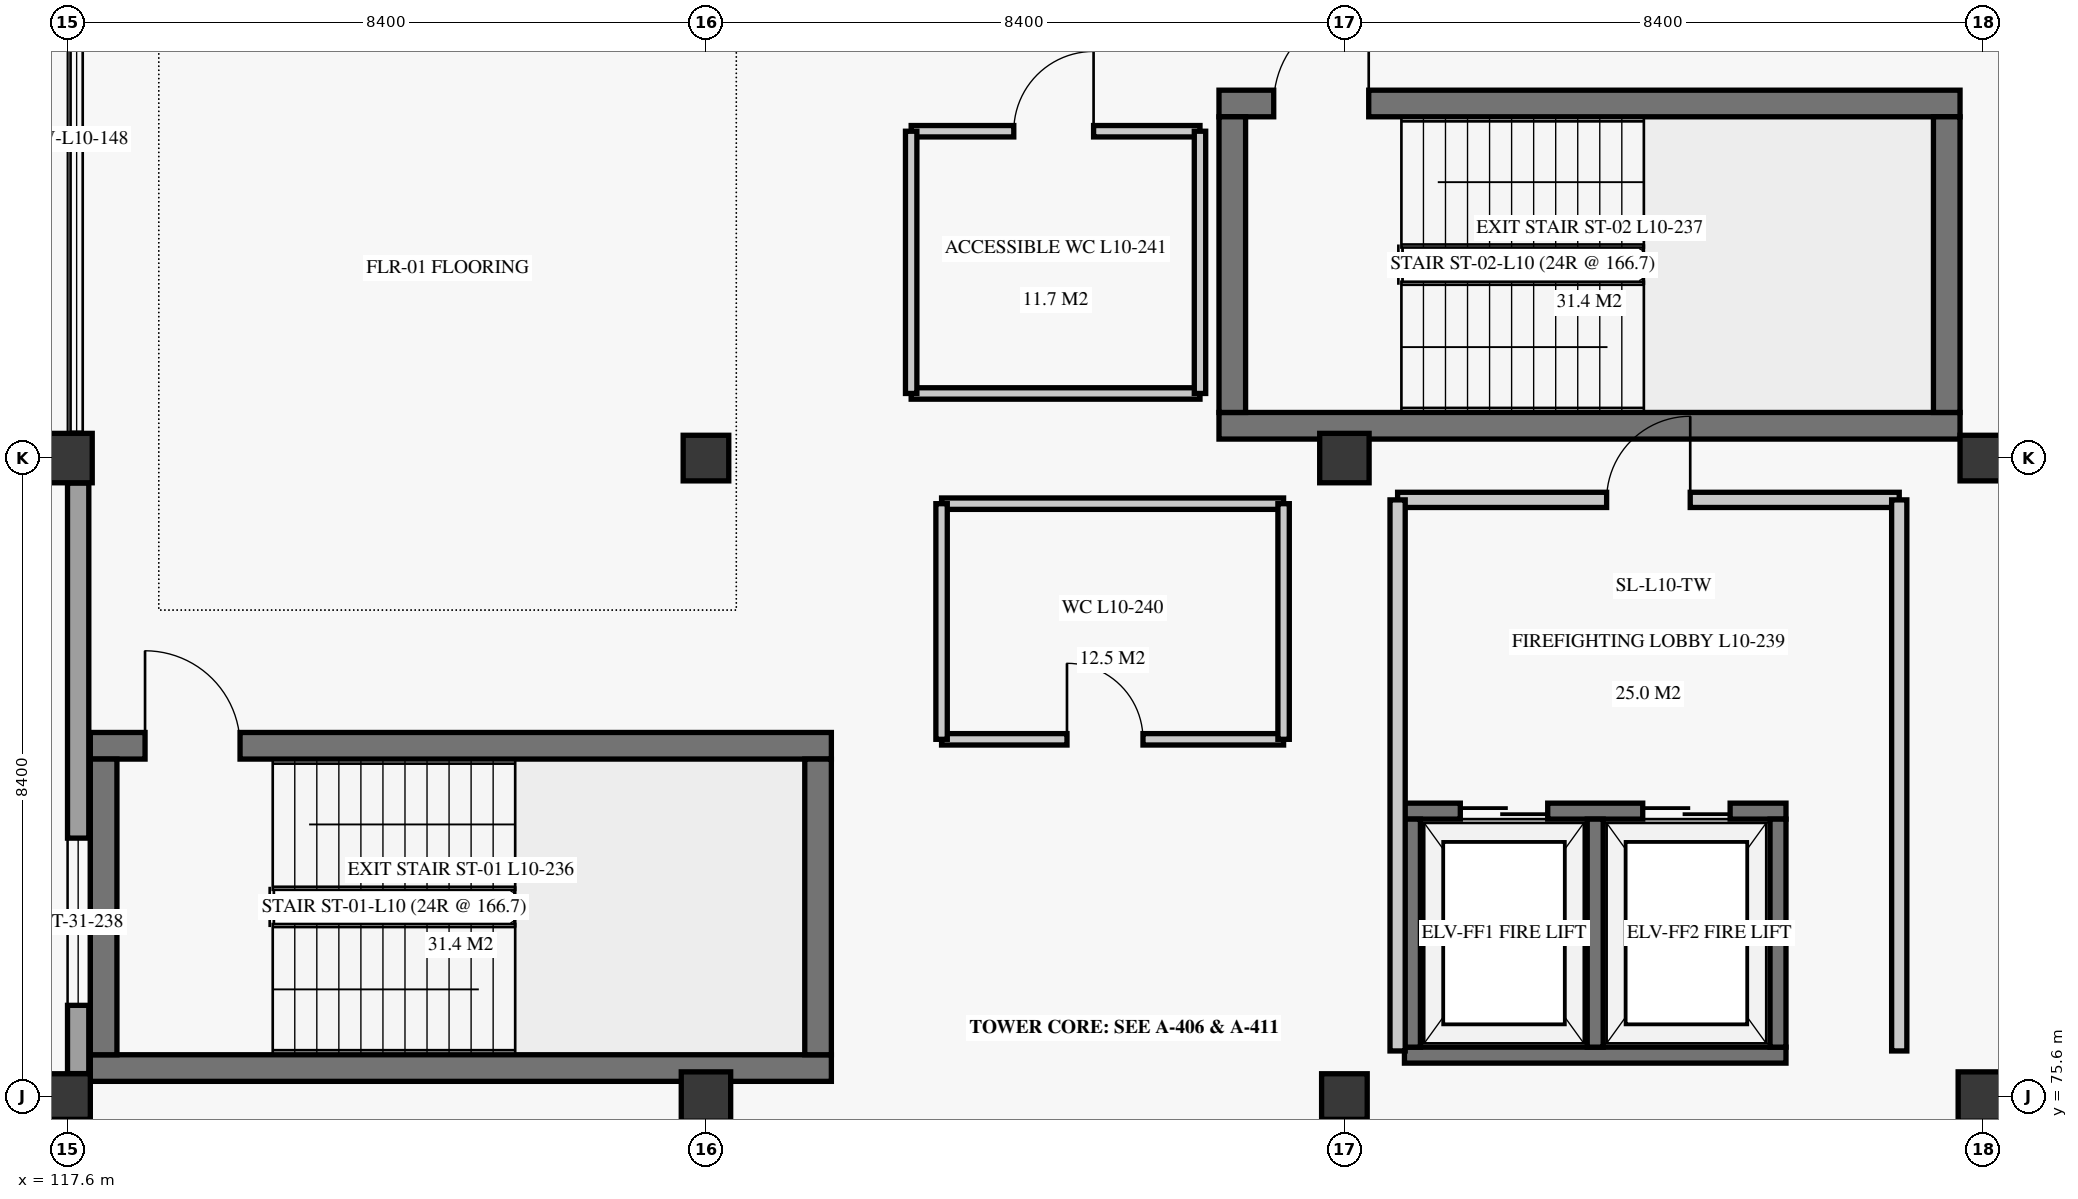
"""IFC4 building model, lengths in metres.
Left out: names, types, materials, properties, quantities, classifications, styles, units other than length and angle.
Written with IfcOpenShell. Run it as: python <this file> out.ifc"""

import sys

from ifc_helpers import new_model, si_unit, direction, frame, frame_2d, origin, origin_2d, place, context, subcontext, project, spatial, rectangle, extrude, element, fill, save


model = new_model("IFC4")
c1 = context("Model", 3, precision=1e-05, world=origin(), true_north=direction((0.0, 1.0)))
c2 = subcontext(c1, "Body", "Model", "MODEL_VIEW")
j1 = project(units=[si_unit("LENGTHUNIT", "METRE"), si_unit("PLANEANGLEUNIT", "RADIAN")], contexts=[c1])
p1 = place(None, origin())
s1 = spatial("IfcSite", under=j1, at=p1, CompositionType="ELEMENT")
p2 = place(p1, origin())
s2 = spatial("IfcBuilding", under=s1, at=p2, CompositionType="ELEMENT")
p3 = place(p2, frame((0.0, 0.0, 42.7)))
s3 = spatial("IfcBuildingStorey", under=s2, at=p3, CompositionType="ELEMENT", Elevation=42.7)
p4 = place(p3, frame((117.6, 75.6, 0.0), z_axis=(0.0, 0.0, 1.0), x_axis=(1.0, 0.0, 0.0)))
e1 = element("IfcColumn", 1, at=p4, inside=s3, PredefinedType="COLUMN", context=c2, shape_type="SweptSolid", body=[
    extrude(rectangle(XDim=0.6, YDim=0.6, at=origin_2d()), origin(), (0.0, 0.0, 1.0), 3.72),
])
for number, where, z_axis, x_axis in (
    (2, (117.6, 84.0, 0.0), (0.0, 0.0, 1.0), (1.0, 0.0, 0.0)),
    (3, (126.0, 75.6, 0.0), (0.0, 0.0, 1.0), (1.0, 0.0, 0.0)),
):
    element("IfcColumn", number, at=place(p3, frame(where, z_axis=z_axis, x_axis=x_axis)), inside=s3, PredefinedType="COLUMN", context=c2, shape_type="SweptSolid", body=[
        extrude(rectangle(XDim=0.65, YDim=0.65, at=origin_2d()), origin(), (0.0, 0.0, 1.0), 3.72),
    ])
for number, where, z_axis, x_axis in (
    (4, (126.0, 84.0, 0.0), (0.0, 0.0, 1.0), (1.0, 0.0, 0.0)),
    (5, (134.4, 75.6, 0.0), (0.0, 0.0, 1.0), (1.0, 0.0, 0.0)),
):
    element("IfcColumn", number, at=place(p3, frame(where, z_axis=z_axis, x_axis=x_axis)), inside=s3, PredefinedType="COLUMN", context=c2, shape_type="SweptSolid", body=[
        extrude(rectangle(XDim=0.6, YDim=0.6, at=origin_2d()), origin(), (0.0, 0.0, 1.0), 3.72),
    ])
for number, where, z_axis, x_axis in (
    (6, (134.4, 84.0, 0.0), (0.0, 0.0, 1.0), (1.0, 0.0, 0.0)),
    (7, (142.8, 75.6, 0.0), (0.0, 0.0, 1.0), (1.0, 0.0, 0.0)),
):
    element("IfcColumn", number, at=place(p3, frame(where, z_axis=z_axis, x_axis=x_axis)), inside=s3, PredefinedType="COLUMN", context=c2, shape_type="SweptSolid", body=[
        extrude(rectangle(XDim=0.65, YDim=0.65, at=origin_2d()), origin(), (0.0, 0.0, 1.0), 3.72),
    ])
p5 = place(p3, frame((142.8, 84.0, 0.0), z_axis=(0.0, 0.0, 1.0), x_axis=(1.0, 0.0, 0.0)))
e8 = element("IfcColumn", 8, at=p5, inside=s3, PredefinedType="COLUMN", context=c2, shape_type="SweptSolid", body=[
    extrude(rectangle(XDim=0.6, YDim=0.6, at=origin_2d()), origin(), (0.0, 0.0, 1.0), 3.72),
])
p6 = place(p3, frame((117.74, 75.902, 0.0), z_axis=(0.0, 0.0, 1.0), x_axis=(0.0, 1.0, 0.0)))
e9 = element("IfcWall", 9, at=p6, inside=s3, PredefinedType="SOLIDWALL", context=c2, shape_type="SweptSolid", body=[
    extrude(rectangle(XDim=7.77, YDim=0.28, at=frame_2d((3.885, 0.0))), origin(), (0.0, 0.0, 1.0), 3.04),
])
p7 = place(p6, frame((0.898, 0.0, 0.85)))
e10 = element("IfcOpeningElement", 10, at=p7, cuts=e9, PredefinedType="OPENING", context=c2, shape_type="SweptSolid", body=[
    extrude(rectangle(XDim=2.2, YDim=1.8, at=frame_2d((1.1, 0.9))), frame((0.0, 0.15, 0.0), z_axis=(0.0, -1.0, 0.0), x_axis=(1.0, 0.0, 0.0)), (0.0, 0.0, 1.0), 0.3),
])
p8 = place(p3, frame((117.9, 75.975, 0.0), z_axis=(0.0, 0.0, 1.0), x_axis=(1.0, 0.0, 0.0)))
e11 = element("IfcWall", 11, at=p8, inside=s3, PredefinedType="SHEAR", context=c2, shape_type="SweptSolid", body=[
    extrude(rectangle(XDim=9.75, YDim=0.35, at=frame_2d((4.875, 0.0))), origin(), (0.0, 0.0, 1.0), 3.72),
])
p9 = place(p3, frame((117.9, 80.215, 0.0), z_axis=(0.0, 0.0, 1.0), x_axis=(1.0, 0.0, 0.0)))
e12 = element("IfcWall", 12, at=p9, inside=s3, PredefinedType="SHEAR", context=c2, shape_type="SweptSolid", body=[
    extrude(rectangle(XDim=9.75, YDim=0.35, at=frame_2d((4.875, 0.0))), origin(), (0.0, 0.0, 1.0), 3.72),
])
p10 = place(p9, frame((0.72, 0.0, 0.0)))
e13 = element("IfcOpeningElement", 13, at=p10, cuts=e12, PredefinedType="OPENING", context=c2, shape_type="SweptSolid", body=[
    extrude(rectangle(XDim=1.25, YDim=2.2, at=frame_2d((0.625, 1.1))), frame((0.0, 0.185, 0.0), z_axis=(0.0, -1.0, 0.0), x_axis=(1.0, 0.0, 0.0)), (0.0, 0.0, 1.0), 0.37),
])
for number, where, z_axis, x_axis in (
    (14, (118.075, 76.15, 0.0), (0.0, 0.0, 1.0), (0.0, 1.0, 0.0)),
    (15, (127.475, 76.15, 0.0), (0.0, 0.0, 1.0), (0.0, 1.0, 0.0)),
):
    element("IfcWall", number, at=place(p3, frame(where, z_axis=z_axis, x_axis=x_axis)), inside=s3, PredefinedType="SHEAR", context=c2, shape_type="SweptSolid", body=[
        extrude(rectangle(XDim=3.89, YDim=0.35, at=frame_2d((1.945, 0.0))), origin(), (0.0, 0.0, 1.0), 3.72),
    ])
p11 = place(p3, frame((132.75, 84.425, 0.0), z_axis=(0.0, 0.0, 1.0), x_axis=(1.0, 0.0, 0.0)))
e16 = element("IfcWall", 16, at=p11, inside=s3, PredefinedType="SHEAR", context=c2, shape_type="SweptSolid", body=[
    extrude(rectangle(XDim=9.75, YDim=0.35, at=frame_2d((4.875, 0.0))), origin(), (0.0, 0.0, 1.0), 3.72),
])
p12 = place(p3, frame((132.75, 88.665, 0.0), z_axis=(0.0, 0.0, 1.0), x_axis=(1.0, 0.0, 0.0)))
e17 = element("IfcWall", 17, at=p12, inside=s3, PredefinedType="SHEAR", context=c2, shape_type="SweptSolid", body=[
    extrude(rectangle(XDim=9.75, YDim=0.35, at=frame_2d((4.875, 0.0))), origin(), (0.0, 0.0, 1.0), 3.72),
])
p13 = place(p12, frame((0.72, 0.0, 0.0)))
e18 = element("IfcOpeningElement", 18, at=p13, cuts=e17, PredefinedType="OPENING", context=c2, shape_type="SweptSolid", body=[
    extrude(rectangle(XDim=1.25, YDim=2.2, at=frame_2d((0.625, 1.1))), frame((0.0, 0.185, 0.0), z_axis=(0.0, -1.0, 0.0), x_axis=(1.0, 0.0, 0.0)), (0.0, 0.0, 1.0), 0.37),
])
for number, where, z_axis, x_axis in (
    (19, (132.925, 84.6, 0.0), (0.0, 0.0, 1.0), (0.0, 1.0, 0.0)),
    (20, (142.325, 84.6, 0.0), (0.0, 0.0, 1.0), (0.0, 1.0, 0.0)),
):
    element("IfcWall", number, at=place(p3, frame(where, z_axis=z_axis, x_axis=x_axis)), inside=s3, PredefinedType="SHEAR", context=c2, shape_type="SweptSolid", body=[
        extrude(rectangle(XDim=3.89, YDim=0.35, at=frame_2d((1.945, 0.0))), origin(), (0.0, 0.0, 1.0), 3.72),
    ])
p14 = place(p3, frame((135.19, 76.145, 0.0), z_axis=(0.0, 0.0, 1.0), x_axis=(1.0, 0.0, 0.0)))
e21 = element("IfcWall", 21, at=p14, inside=s3, PredefinedType="SHEAR", context=c2, shape_type="SweptSolid", body=[
    extrude(rectangle(XDim=5.02, YDim=0.21, at=frame_2d((2.51, 0.0))), origin(), (0.0, 0.0, 1.0), 3.72),
])
p15 = place(p3, frame((135.19, 79.355, 0.0), z_axis=(0.0, 0.0, 1.0), x_axis=(1.0, 0.0, 0.0)))
e22 = element("IfcWall", 22, at=p15, inside=s3, PredefinedType="SHEAR", context=c2, shape_type="SweptSolid", body=[
    extrude(rectangle(XDim=5.02, YDim=0.21, at=frame_2d((2.51, 0.0))), origin(), (0.0, 0.0, 1.0), 3.72),
])
p16 = place(p15, frame((0.735, 0.0, 0.0)))
e23 = element("IfcOpeningElement", 23, at=p16, cuts=e22, PredefinedType="OPENING", context=c2, shape_type="SweptSolid", body=[
    extrude(rectangle(XDim=1.15, YDim=2.2, at=frame_2d((0.575, 1.1))), frame((0.0, 0.115, 0.0), z_axis=(0.0, -1.0, 0.0), x_axis=(1.0, 0.0, 0.0)), (0.0, 0.0, 1.0), 0.23),
])
p17 = place(p15, frame((3.135, 0.0, 0.0)))
e24 = element("IfcOpeningElement", 24, at=p17, cuts=e22, PredefinedType="OPENING", context=c2, shape_type="SweptSolid", body=[
    extrude(rectangle(XDim=1.15, YDim=2.2, at=frame_2d((0.575, 1.1))), frame((0.0, 0.115, 0.0), z_axis=(0.0, -1.0, 0.0), x_axis=(1.0, 0.0, 0.0)), (0.0, 0.0, 1.0), 0.23),
])
for number, where, z_axis, x_axis in (
    (25, (135.295, 76.25, 0.0), (0.0, 0.0, 1.0), (0.0, 1.0, 0.0)),
    (26, (140.105, 76.25, 0.0), (0.0, 0.0, 1.0), (0.0, 1.0, 0.0)),
    (27, (137.7, 76.25, 0.0), (0.0, 0.0, 1.0), (0.0, 1.0, 0.0)),
):
    element("IfcWall", number, at=place(p3, frame(where, z_axis=z_axis, x_axis=x_axis)), inside=s3, PredefinedType="SHEAR", context=c2, shape_type="SweptSolid", body=[
        extrude(rectangle(XDim=3.0, YDim=0.21, at=frame_2d((1.5, 0.0))), origin(), (0.0, 0.0, 1.0), 3.72),
    ])
p18 = place(p3, frame((135.1, 83.45, 0.0), z_axis=(0.0, 0.0, 1.0), x_axis=(1.0, 0.0, 0.0)))
e28 = element("IfcWall", 28, at=p18, inside=s3, PredefinedType="PARTITIONING", context=c2, shape_type="SweptSolid", body=[
    extrude(rectangle(XDim=6.6, YDim=0.2, at=frame_2d((3.3, 0.0))), origin(), (0.0, 0.0, 1.0), 3.34),
])
p19 = place(p18, frame((2.75, 0.0, 0.0)))
e29 = element("IfcOpeningElement", 29, at=p19, cuts=e28, PredefinedType="OPENING", context=c2, shape_type="SweptSolid", body=[
    extrude(rectangle(XDim=1.1, YDim=2.2, at=frame_2d((0.55, 1.1))), frame((0.0, 0.11, 0.0), z_axis=(0.0, -1.0, 0.0), x_axis=(1.0, 0.0, 0.0)), (0.0, 0.0, 1.0), 0.22),
])
for number, where, z_axis, x_axis in (
    (30, (135.1, 76.2, 0.0), (0.0, 0.0, 1.0), (0.0, 1.0, 0.0)),
    (31, (141.7, 76.2, 0.0), (0.0, 0.0, 1.0), (0.0, 1.0, 0.0)),
):
    element("IfcWall", number, at=place(p3, frame(where, z_axis=z_axis, x_axis=x_axis)), inside=s3, PredefinedType="PARTITIONING", context=c2, shape_type="SweptSolid", body=[
        extrude(rectangle(XDim=7.25, YDim=0.2, at=frame_2d((3.625, 0.0))), origin(), (0.0, 0.0, 1.0), 3.34),
    ])
p20 = place(p3, frame((129.1, 80.3, 0.0), z_axis=(0.0, 0.0, 1.0), x_axis=(1.0, 0.0, 0.0)))
e32 = element("IfcWall", 32, at=p20, inside=s3, PredefinedType="PARTITIONING", context=c2, shape_type="SweptSolid", body=[
    extrude(rectangle(XDim=4.5, YDim=0.15, at=frame_2d((2.25, 0.0))), origin(), (0.0, 0.0, 1.0), 3.34),
])
p21 = place(p20, frame((1.65, 0.0, 0.0)))
e33 = element("IfcOpeningElement", 33, at=p21, cuts=e32, PredefinedType="OPENING", context=c2, shape_type="SweptSolid", body=[
    extrude(rectangle(XDim=1.0, YDim=2.1, at=frame_2d((0.5, 1.05))), frame((0.0, 0.085, 0.0), z_axis=(0.0, -1.0, 0.0), x_axis=(1.0, 0.0, 0.0)), (0.0, 0.0, 1.0), 0.17),
])
p22 = place(p3, frame((129.1, 83.4, 0.0), z_axis=(0.0, 0.0, 1.0), x_axis=(1.0, 0.0, 0.0)))
e34 = element("IfcWall", 34, at=p22, inside=s3, PredefinedType="PARTITIONING", context=c2, shape_type="SweptSolid", body=[
    extrude(rectangle(XDim=4.5, YDim=0.15, at=frame_2d((2.25, 0.0))), origin(), (0.0, 0.0, 1.0), 3.34),
])
for number, where, z_axis, x_axis in (
    (35, (129.1, 80.3, 0.0), (0.0, 0.0, 1.0), (0.0, 1.0, 0.0)),
    (36, (133.6, 80.3, 0.0), (0.0, 0.0, 1.0), (0.0, 1.0, 0.0)),
):
    element("IfcWall", number, at=place(p3, frame(where, z_axis=z_axis, x_axis=x_axis)), inside=s3, PredefinedType="PARTITIONING", context=c2, shape_type="SweptSolid", body=[
        extrude(rectangle(XDim=3.1, YDim=0.15, at=frame_2d((1.55, 0.0))), origin(), (0.0, 0.0, 1.0), 3.34),
    ])
p23 = place(p3, frame((128.7, 88.3, 0.0), z_axis=(0.0, 0.0, 1.0), x_axis=(1.0, 0.0, 0.0)))
e37 = element("IfcWall", 37, at=p23, inside=s3, PredefinedType="PARTITIONING", context=c2, shape_type="SweptSolid", body=[
    extrude(rectangle(XDim=3.8, YDim=0.15, at=frame_2d((1.9, 0.0))), origin(), (0.0, 0.0, 1.0), 3.34),
])
p24 = place(p23, frame((1.35, 0.0, 0.0)))
e38 = element("IfcOpeningElement", 38, at=p24, cuts=e37, PredefinedType="OPENING", context=c2, shape_type="SweptSolid", body=[
    extrude(rectangle(XDim=1.05, YDim=2.15, at=frame_2d((0.525, 1.075))), frame((0.0, 0.085, 0.0), z_axis=(0.0, -1.0, 0.0), x_axis=(1.0, 0.0, 0.0)), (0.0, 0.0, 1.0), 0.17),
])
p25 = place(p3, frame((128.7, 84.85, 0.0), z_axis=(0.0, 0.0, 1.0), x_axis=(1.0, 0.0, 0.0)))
e39 = element("IfcWall", 39, at=p25, inside=s3, PredefinedType="PARTITIONING", context=c2, shape_type="SweptSolid", body=[
    extrude(rectangle(XDim=3.8, YDim=0.15, at=frame_2d((1.9, 0.0))), origin(), (0.0, 0.0, 1.0), 3.34),
])
for number, where, z_axis, x_axis in (
    (40, (128.7, 84.85, 0.0), (0.0, 0.0, 1.0), (0.0, 1.0, 0.0)),
    (41, (132.5, 84.85, 0.0), (0.0, 0.0, 1.0), (0.0, 1.0, 0.0)),
):
    element("IfcWall", number, at=place(p3, frame(where, z_axis=z_axis, x_axis=x_axis)), inside=s3, PredefinedType="PARTITIONING", context=c2, shape_type="SweptSolid", body=[
        extrude(rectangle(XDim=3.45, YDim=0.15, at=frame_2d((1.725, 0.0))), origin(), (0.0, 0.0, 1.0), 3.34),
    ])
p26 = place(p7, origin())
e42 = element("IfcWindow", 42, at=p26, inside=s3, PartitioningType="SINGLE_PANEL", PredefinedType="WINDOW", context=c2, shape_type="SweptSolid", body=[
    extrude(rectangle(XDim=2.2, YDim=1.8, at=frame_2d((1.1, 0.9))), frame((0.0, 0.03, 0.0), z_axis=(0.0, -1.0, 0.0), x_axis=(1.0, 0.0, 0.0)), (0.0, 0.0, 1.0), 0.06),
])
fill(e10, e42)
p27 = place(p10, origin())
e43 = element("IfcDoor", 43, at=p27, inside=s3, OperationType="SINGLE_SWING_LEFT", PredefinedType="DOOR", context=c2, shape_type="SweptSolid", body=[
    extrude(rectangle(XDim=1.25, YDim=2.2, at=frame_2d((0.625, 1.1))), frame((0.0, 0.025, 0.0), z_axis=(0.0, -1.0, 0.0), x_axis=(1.0, 0.0, 0.0)), (0.0, 0.0, 1.0), 0.05),
])
fill(e13, e43)
p28 = place(p13, origin())
e44 = element("IfcDoor", 44, at=p28, inside=s3, OperationType="SINGLE_SWING_RIGHT", PredefinedType="DOOR", context=c2, shape_type="SweptSolid", body=[
    extrude(rectangle(XDim=1.25, YDim=2.2, at=frame_2d((0.625, 1.1))), frame((0.0, 0.025, 0.0), z_axis=(0.0, -1.0, 0.0), x_axis=(1.0, 0.0, 0.0)), (0.0, 0.0, 1.0), 0.05),
])
fill(e18, e44)
p29 = place(p16, origin())
e45 = element("IfcDoor", 45, at=p29, inside=s3, OperationType="DOUBLE_DOOR_SLIDING", PredefinedType="DOOR", context=c2, shape_type="SweptSolid", body=[
    extrude(rectangle(XDim=1.15, YDim=2.2, at=frame_2d((0.575, 1.1))), frame((0.0, 0.025, 0.0), z_axis=(0.0, -1.0, 0.0), x_axis=(1.0, 0.0, 0.0)), (0.0, 0.0, 1.0), 0.05),
])
fill(e23, e45)
p30 = place(p17, origin())
e46 = element("IfcDoor", 46, at=p30, inside=s3, OperationType="DOUBLE_DOOR_SLIDING", PredefinedType="DOOR", context=c2, shape_type="SweptSolid", body=[
    extrude(rectangle(XDim=1.15, YDim=2.2, at=frame_2d((0.575, 1.1))), frame((0.0, 0.025, 0.0), z_axis=(0.0, -1.0, 0.0), x_axis=(1.0, 0.0, 0.0)), (0.0, 0.0, 1.0), 0.05),
])
fill(e24, e46)
p31 = place(p19, origin())
e47 = element("IfcDoor", 47, at=p31, inside=s3, OperationType="SINGLE_SWING_RIGHT", PredefinedType="DOOR", context=c2, shape_type="SweptSolid", body=[
    extrude(rectangle(XDim=1.1, YDim=2.2, at=frame_2d((0.55, 1.1))), frame((0.0, 0.025, 0.0), z_axis=(0.0, -1.0, 0.0), x_axis=(1.0, 0.0, 0.0)), (0.0, 0.0, 1.0), 0.05),
])
fill(e29, e47)
p32 = place(p21, origin())
e48 = element("IfcDoor", 48, at=p32, inside=s3, OperationType="SINGLE_SWING_LEFT", PredefinedType="DOOR", context=c2, shape_type="SweptSolid", body=[
    extrude(rectangle(XDim=1.0, YDim=2.1, at=frame_2d((0.5, 1.05))), frame((0.0, 0.025, 0.0), z_axis=(0.0, -1.0, 0.0), x_axis=(1.0, 0.0, 0.0)), (0.0, 0.0, 1.0), 0.05),
])
fill(e33, e48)
p33 = place(p24, origin())
e49 = element("IfcDoor", 49, at=p33, inside=s3, OperationType="SINGLE_SWING_RIGHT", PredefinedType="DOOR", context=c2, shape_type="SweptSolid", body=[
    extrude(rectangle(XDim=1.05, YDim=2.15, at=frame_2d((0.525, 1.075))), frame((0.0, 0.025, 0.0), z_axis=(0.0, -1.0, 0.0), x_axis=(1.0, 0.0, 0.0)), (0.0, 0.0, 1.0), 0.05),
])
fill(e38, e49)
save(model, sys.argv[1])
